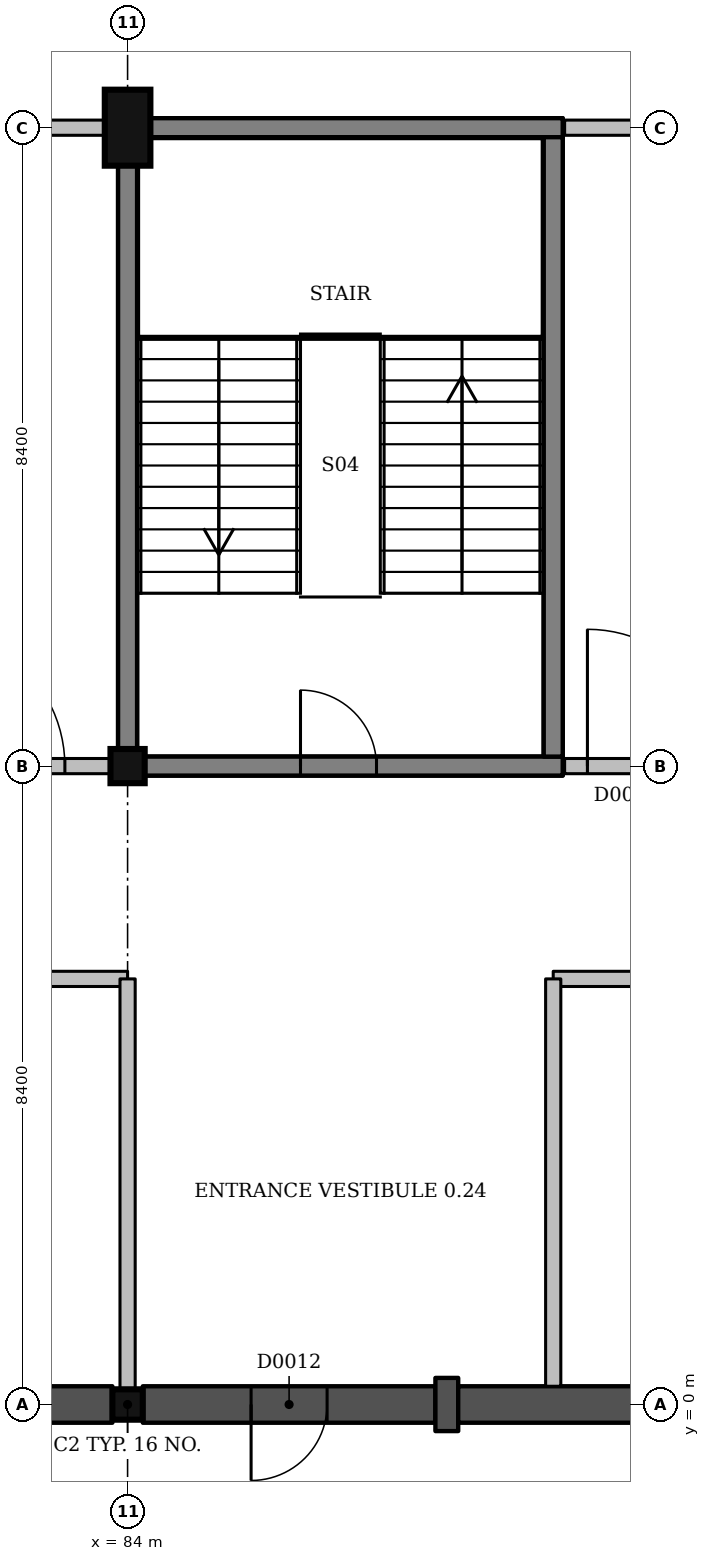
"""IFC4 building model, lengths in metres.
Left out: names, types, materials, properties, quantities, classifications, styles, units other than length and angle.
Written with IfcOpenShell. Run it as: python <this file> out.ifc"""

import sys

from ifc_helpers import new_model, si_unit, direction, frame, frame_2d, origin, origin_2d, place, context, subcontext, project, spatial, rectangle, extrude, element, fill, save


model = new_model("IFC4")
c1 = context("Model", 3, precision=1e-05, world=origin(), true_north=direction((0.0, 1.0)))
c2 = subcontext(c1, "Body", "Model", "MODEL_VIEW")
j1 = project(units=[si_unit("LENGTHUNIT", "METRE"), si_unit("PLANEANGLEUNIT", "RADIAN")], contexts=[c1])
p1 = place(None, origin())
s1 = spatial("IfcSite", under=j1, at=p1, CompositionType="ELEMENT")
p2 = place(p1, origin())
s2 = spatial("IfcBuilding", under=s1, at=p2, CompositionType="ELEMENT")
p3 = place(p2, origin())
s3 = spatial("IfcBuildingStorey", under=s2, at=p3, CompositionType="ELEMENT", Elevation=0.0)
p4 = place(p3, frame((84.0, 0.0, -1.5), z_axis=(0.0, 0.0, 1.0), x_axis=(1.0, 0.0, 0.0)))
e1 = element("IfcColumn", 1, at=p4, inside=s3, PredefinedType="COLUMN", context=c2, shape_type="SweptSolid", body=[
    extrude(rectangle(XDim=0.4, YDim=0.4, at=origin_2d()), origin(), (0.0, 0.0, 1.0), 6.0),
])
p5 = place(p3, frame((84.0, 8.4, -1.5), z_axis=(0.0, 0.0, 1.0), x_axis=(1.0, 0.0, 0.0)))
e2 = element("IfcColumn", 2, at=p5, inside=s3, PredefinedType="COLUMN", context=c2, shape_type="SweptSolid", body=[
    extrude(rectangle(XDim=0.45, YDim=0.45, at=origin_2d()), origin(), (0.0, 0.0, 1.0), 6.0),
])
p6 = place(p3, frame((84.0, 16.8, -1.5), z_axis=(0.0, 0.0, 1.0), x_axis=(1.0, 0.0, 0.0)))
e3 = element("IfcColumn", 3, at=p6, inside=s3, PredefinedType="COLUMN", context=c2, shape_type="SweptSolid", body=[
    extrude(rectangle(XDim=0.6, YDim=1.0, at=origin_2d()), origin(), (0.0, 0.0, 1.0), 6.0),
])
p7 = place(p3, frame((84.225, 8.4, 0.0), z_axis=(0.0, 0.0, 1.0), x_axis=(1.0, 0.0, 0.0)))
e4 = element("IfcWall", 4, at=p7, inside=s3, PredefinedType="SHEAR", context=c2, shape_type="SweptSolid", body=[
    extrude(rectangle(XDim=5.5, YDim=0.25, at=frame_2d((2.75, 0.0))), origin(), (0.0, 0.0, 1.0), 4.5),
])
p8 = place(p7, frame((2.05, 0.0, 0.0)))
e5 = element("IfcOpeningElement", 5, at=p8, cuts=e4, PredefinedType="OPENING", context=c2, shape_type="SweptSolid", body=[
    extrude(rectangle(XDim=1.0, YDim=2.1, at=frame_2d((0.5, 1.05))), frame((0.0, 0.135, 0.0), z_axis=(0.0, -1.0, 0.0), x_axis=(1.0, 0.0, 0.0)), (0.0, 0.0, 1.0), 0.27),
])
p9 = place(p3, frame((84.3, 16.8, 0.0), z_axis=(0.0, 0.0, 1.0), x_axis=(1.0, 0.0, 0.0)))
e6 = element("IfcWall", 6, at=p9, inside=s3, PredefinedType="SHEAR", context=c2, shape_type="SweptSolid", body=[
    extrude(rectangle(XDim=5.425, YDim=0.25, at=frame_2d((2.712, 0.0))), origin(), (0.0, 0.0, 1.0), 4.5),
])
p10 = place(p3, frame((84.0, 8.625, 0.0), z_axis=(0.0, 0.0, 1.0), x_axis=(0.0, 1.0, 0.0)))
e7 = element("IfcWall", 7, at=p10, inside=s3, PredefinedType="SHEAR", context=c2, shape_type="SweptSolid", body=[
    extrude(rectangle(XDim=7.675, YDim=0.25, at=frame_2d((3.837, 0.0))), origin(), (0.0, 0.0, 1.0), 4.5),
])
p11 = place(p3, frame((89.6, 8.525, 0.0), z_axis=(0.0, 0.0, 1.0), x_axis=(0.0, 1.0, 0.0)))
e8 = element("IfcWall", 8, at=p11, inside=s3, PredefinedType="SHEAR", context=c2, shape_type="SweptSolid", body=[
    extrude(rectangle(XDim=8.15, YDim=0.25, at=frame_2d((4.075, 0.0))), origin(), (0.0, 0.0, 1.0), 4.5),
])
for number, where, z_axis, x_axis in (
    (9, (83.875, 8.4, -1.5), (0.0, 0.0, 1.0), (1.0, 0.0, 0.0)),
    (10, (83.875, 16.8, -1.5), (0.0, 0.0, 1.0), (1.0, 0.0, 0.0)),
):
    element("IfcWall", number, at=place(p3, frame(where, z_axis=z_axis, x_axis=x_axis)), inside=s3, PredefinedType="SHEAR", context=c2, shape_type="SweptSolid", body=[
        extrude(rectangle(XDim=5.85, YDim=0.25, at=frame_2d((2.925, 0.0))), origin(), (0.0, 0.0, 1.0), 1.5),
    ])
for number, where, z_axis, x_axis in (
    (11, (84.0, 8.525, -1.5), (0.0, 0.0, 1.0), (0.0, 1.0, 0.0)),
    (12, (89.6, 8.525, -1.5), (0.0, 0.0, 1.0), (0.0, 1.0, 0.0)),
):
    element("IfcWall", number, at=place(p3, frame(where, z_axis=z_axis, x_axis=x_axis)), inside=s3, PredefinedType="SHEAR", context=c2, shape_type="SweptSolid", body=[
        extrude(rectangle(XDim=8.15, YDim=0.25, at=frame_2d((4.075, 0.0))), origin(), (0.0, 0.0, 1.0), 1.5),
    ])
p12 = place(p3, frame((79.95, 0.0, 0.0), z_axis=(0.0, 0.0, 1.0), x_axis=(1.0, 0.0, 0.0)))
e13 = element("IfcWall", 13, at=p12, inside=s3, PredefinedType="SOLIDWALL", context=c2, shape_type="SweptSolid", body=[
    extrude(rectangle(XDim=3.85, YDim=0.48, at=frame_2d((1.925, 0.0))), origin(), (0.0, 0.0, 1.0), 3.45),
])
p13 = place(p12, frame((1.325, 0.0, 0.9)))
e14 = element("IfcOpeningElement", 14, at=p13, cuts=e13, PredefinedType="OPENING", context=c2, shape_type="SweptSolid", body=[
    extrude(rectangle(XDim=1.2, YDim=2.1, at=frame_2d((0.6, 1.05))), frame((0.0, 0.25, 0.0), z_axis=(0.0, -1.0, 0.0), x_axis=(1.0, 0.0, 0.0)), (0.0, 0.0, 1.0), 0.5),
])
p14 = place(p3, frame((84.2, 0.0, 0.0), z_axis=(0.0, 0.0, 1.0), x_axis=(1.0, 0.0, 0.0)))
e15 = element("IfcWall", 15, at=p14, inside=s3, PredefinedType="SOLIDWALL", context=c2, shape_type="SweptSolid", body=[
    extrude(rectangle(XDim=3.85, YDim=0.48, at=frame_2d((1.925, 0.0))), origin(), (0.0, 0.0, 1.0), 3.45),
])
p15 = place(p14, frame((1.425, 0.0, 0.0)))
e16 = element("IfcOpeningElement", 16, at=p15, cuts=e15, PredefinedType="OPENING", context=c2, shape_type="SweptSolid", body=[
    extrude(rectangle(XDim=1.0, YDim=2.1, at=frame_2d((0.5, 1.05))), frame((0.0, 0.25, 0.0), z_axis=(0.0, -1.0, 0.0), x_axis=(1.0, 0.0, 0.0)), (0.0, 0.0, 1.0), 0.5),
])
p16 = place(p3, frame((88.05, 0.0, 0.0), z_axis=(0.0, 0.0, 1.0), x_axis=(1.0, 0.0, 0.0)))
e17 = element("IfcWall", 17, at=p16, inside=s3, PredefinedType="SOLIDWALL", context=c2, shape_type="SweptSolid", body=[
    extrude(rectangle(XDim=0.3, YDim=0.7, at=frame_2d((0.15, 0.0))), origin(), (0.0, 0.0, 1.0), 3.45),
])
p17 = place(p3, frame((88.35, 0.0, 0.0), z_axis=(0.0, 0.0, 1.0), x_axis=(1.0, 0.0, 0.0)))
e18 = element("IfcWall", 18, at=p17, inside=s3, PredefinedType="SOLIDWALL", context=c2, shape_type="SweptSolid", body=[
    extrude(rectangle(XDim=3.85, YDim=0.48, at=frame_2d((1.925, 0.0))), origin(), (0.0, 0.0, 1.0), 3.45),
])
p18 = place(p3, frame((78.4, 5.6, 0.0), z_axis=(0.0, 0.0, 1.0), x_axis=(1.0, 0.0, 0.0)))
e19 = element("IfcWall", 19, at=p18, inside=s3, PredefinedType="PARTITIONING", context=c2, shape_type="SweptSolid", body=[
    extrude(rectangle(XDim=5.6, YDim=0.2, at=frame_2d((2.8, 0.0))), origin(), (0.0, 0.0, 1.0), 3.5),
])
p19 = place(p18, frame((2.4, 0.0, 0.0)))
e20 = element("IfcOpeningElement", 20, at=p19, cuts=e19, PredefinedType="OPENING", context=c2, shape_type="SweptSolid", body=[
    extrude(rectangle(XDim=1.0, YDim=2.1, at=frame_2d((0.5, 1.05))), frame((0.0, 0.11, 0.0), z_axis=(0.0, -1.0, 0.0), x_axis=(1.0, 0.0, 0.0)), (0.0, 0.0, 1.0), 0.22),
])
p20 = place(p3, frame((89.6, 5.6, 0.0), z_axis=(0.0, 0.0, 1.0), x_axis=(1.0, 0.0, 0.0)))
e21 = element("IfcWall", 21, at=p20, inside=s3, PredefinedType="PARTITIONING", context=c2, shape_type="SweptSolid", body=[
    extrude(rectangle(XDim=14.0, YDim=0.2, at=frame_2d((7.0, 0.0))), origin(), (0.0, 0.0, 1.0), 3.5),
])
p21 = place(p20, frame((6.6, 0.0, 0.0)))
e22 = element("IfcOpeningElement", 22, at=p21, cuts=e21, PredefinedType="OPENING", context=c2, shape_type="SweptSolid", body=[
    extrude(rectangle(XDim=1.0, YDim=2.1, at=frame_2d((0.5, 1.05))), frame((0.0, 0.11, 0.0), z_axis=(0.0, -1.0, 0.0), x_axis=(1.0, 0.0, 0.0)), (0.0, 0.0, 1.0), 0.22),
])
p22 = place(p3, frame((75.825, 8.4, 0.0), z_axis=(0.0, 0.0, 1.0), x_axis=(1.0, 0.0, 0.0)))
e23 = element("IfcWall", 23, at=p22, inside=s3, PredefinedType="PARTITIONING", context=c2, shape_type="SweptSolid", body=[
    extrude(rectangle(XDim=7.95, YDim=0.2, at=frame_2d((3.975, 0.0))), origin(), (0.0, 0.0, 1.0), 3.5),
])
p23 = place(p22, frame((5.55, 0.0, 0.0)))
e24 = element("IfcOpeningElement", 24, at=p23, cuts=e23, PredefinedType="OPENING", context=c2, shape_type="SweptSolid", body=[
    extrude(rectangle(XDim=1.8, YDim=2.1, at=frame_2d((0.9, 1.05))), frame((0.0, 0.11, 0.0), z_axis=(0.0, -1.0, 0.0), x_axis=(1.0, 0.0, 0.0)), (0.0, 0.0, 1.0), 0.22),
])
p24 = place(p3, frame((89.75, 8.4, 0.0), z_axis=(0.0, 0.0, 1.0), x_axis=(1.0, 0.0, 0.0)))
e25 = element("IfcWall", 25, at=p24, inside=s3, PredefinedType="PARTITIONING", context=c2, shape_type="SweptSolid", body=[
    extrude(rectangle(XDim=2.425, YDim=0.2, at=frame_2d((1.212, 0.0))), origin(), (0.0, 0.0, 1.0), 3.6),
])
p25 = place(p24, frame((0.3, 0.0, 0.0)))
e26 = element("IfcOpeningElement", 26, at=p25, cuts=e25, PredefinedType="OPENING", context=c2, shape_type="SweptSolid", body=[
    extrude(rectangle(XDim=1.8, YDim=2.1, at=frame_2d((0.9, 1.05))), frame((0.0, 0.11, 0.0), z_axis=(0.0, -1.0, 0.0), x_axis=(1.0, 0.0, 0.0)), (0.0, 0.0, 1.0), 0.22),
])
p26 = place(p3, frame((75.8, 16.8, 0.0), z_axis=(0.0, 0.0, 1.0), x_axis=(1.0, 0.0, 0.0)))
e27 = element("IfcWall", 27, at=p26, inside=s3, PredefinedType="PARTITIONING", context=c2, shape_type="SweptSolid", body=[
    extrude(rectangle(XDim=7.9, YDim=0.2, at=frame_2d((3.95, 0.0))), origin(), (0.0, 0.0, 1.0), 3.45),
])
p27 = place(p3, frame((89.75, 16.8, 0.0), z_axis=(0.0, 0.0, 1.0), x_axis=(1.0, 0.0, 0.0)))
e28 = element("IfcWall", 28, at=p27, inside=s3, PredefinedType="PARTITIONING", context=c2, shape_type="SweptSolid", body=[
    extrude(rectangle(XDim=2.45, YDim=0.2, at=frame_2d((1.225, 0.0))), origin(), (0.0, 0.0, 1.0), 3.45),
])
p28 = place(p3, frame((84.0, 0.2, 0.0), z_axis=(0.0, 0.0, 1.0), x_axis=(0.0, 1.0, 0.0)))
e29 = element("IfcWall", 29, at=p28, inside=s3, PredefinedType="PARTITIONING", context=c2, shape_type="SweptSolid", body=[
    extrude(rectangle(XDim=5.4, YDim=0.2, at=frame_2d((2.7, 0.0))), origin(), (0.0, 0.0, 1.0), 3.5),
])
p29 = place(p3, frame((89.6, 0.24, 0.0), z_axis=(0.0, 0.0, 1.0), x_axis=(0.0, 1.0, 0.0)))
e30 = element("IfcWall", 30, at=p29, inside=s3, PredefinedType="PARTITIONING", context=c2, shape_type="SweptSolid", body=[
    extrude(rectangle(XDim=5.36, YDim=0.2, at=frame_2d((2.68, 0.0))), origin(), (0.0, 0.0, 1.0), 4.15),
])
p30 = place(p15, origin())
e31 = element("IfcDoor", 31, at=p30, inside=s3, OperationType="SINGLE_SWING_LEFT", PredefinedType="DOOR", context=c2, shape_type="SweptSolid", body=[
    extrude(rectangle(XDim=1.0, YDim=2.1, at=frame_2d((0.5, 1.05))), frame((0.0, 0.025, 0.0), z_axis=(0.0, -1.0, 0.0), x_axis=(1.0, 0.0, 0.0)), (0.0, 0.0, 1.0), 0.05),
])
fill(e16, e31)
p31 = place(p23, origin())
e32 = element("IfcDoor", 32, at=p31, inside=s3, OperationType="DOUBLE_DOOR_SINGLE_SWING", PredefinedType="DOOR", context=c2, shape_type="SweptSolid", body=[
    extrude(rectangle(XDim=1.8, YDim=2.1, at=frame_2d((0.9, 1.05))), frame((0.0, 0.025, 0.0), z_axis=(0.0, -1.0, 0.0), x_axis=(1.0, 0.0, 0.0)), (0.0, 0.0, 1.0), 0.05),
])
fill(e24, e32)
p32 = place(p25, origin())
e33 = element("IfcDoor", 33, at=p32, inside=s3, OperationType="DOUBLE_DOOR_SINGLE_SWING", PredefinedType="DOOR", context=c2, shape_type="SweptSolid", body=[
    extrude(rectangle(XDim=1.8, YDim=2.1, at=frame_2d((0.9, 1.05))), frame((0.0, 0.025, 0.0), z_axis=(0.0, -1.0, 0.0), x_axis=(1.0, 0.0, 0.0)), (0.0, 0.0, 1.0), 0.05),
])
fill(e26, e33)
p33 = place(p8, origin())
e34 = element("IfcDoor", 34, at=p33, inside=s3, OperationType="SINGLE_SWING_LEFT", PredefinedType="DOOR", context=c2, shape_type="SweptSolid", body=[
    extrude(rectangle(XDim=1.0, YDim=2.1, at=frame_2d((0.5, 1.05))), frame((0.0, 0.025, 0.0), z_axis=(0.0, -1.0, 0.0), x_axis=(1.0, 0.0, 0.0)), (0.0, 0.0, 1.0), 0.05),
])
fill(e5, e34)
save(model, sys.argv[1])
